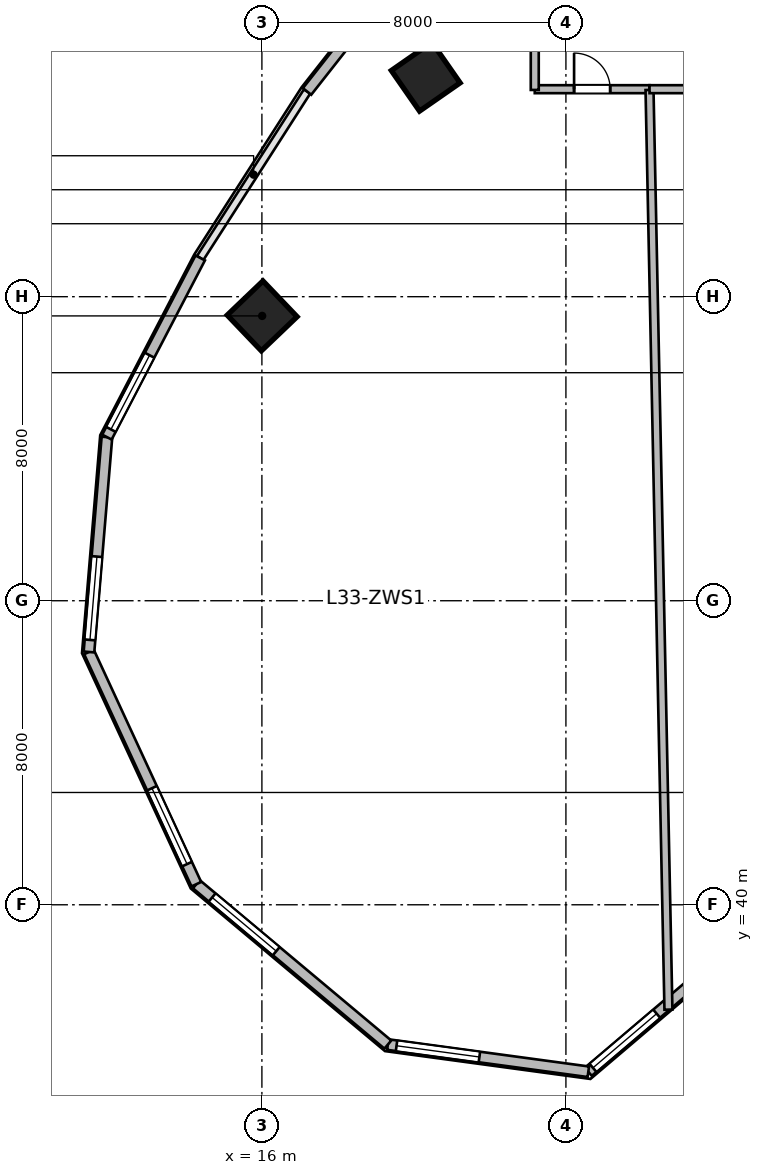
"""IFC4 building model, lengths in metres.
Left out: names, types, materials, properties, quantities, classifications, styles, units other than length and angle.
Written with IfcOpenShell. Run it as: python <this file> out.ifc"""

import sys

from ifc_helpers import new_model, si_unit, direction, frame, frame_2d, origin, origin_2d, place, context, subcontext, project, spatial, rectangle, extrude, source, transform, mapped, element, fill, save


model = new_model("IFC4")
c1 = context("Model", 3, precision=1e-05, world=origin(), true_north=direction((0.0, 1.0)))
c2 = subcontext(c1, "Body", "Model", "MODEL_VIEW")
j1 = project(units=[si_unit("LENGTHUNIT", "METRE"), si_unit("PLANEANGLEUNIT", "RADIAN")], contexts=[c1])
p1 = place(None, origin())
s1 = spatial("IfcSite", under=j1, at=p1, CompositionType="ELEMENT")
p2 = place(p1, origin())
s2 = spatial("IfcBuilding", under=s1, at=p2, CompositionType="ELEMENT")
p3 = place(p2, frame((0.0, 0.0, 138.9)))
s3 = spatial("IfcBuildingStorey", under=s2, at=p3, CompositionType="ELEMENT", Elevation=138.9)
m1 = source(origin(), c2, "Body", "SweptSolid", [
    extrude(rectangle(XDim=1.3, YDim=1.3, at=origin_2d()), origin(), (0.0, 0.0, 1.0), 3.9),
])
for number, where, z_axis, x_axis in (
    (1, (16.007, 55.494, 0.0), (0.0, 0.0, 1.0), (-0.691, 0.723, 0.0)),
    (2, (20.311, 61.789, 0.0), (0.0, 0.0, 1.0), (-0.571, 0.821, 0.0)),
):
    element("IfcColumn", number, at=place(p3, frame(where, z_axis=z_axis, x_axis=x_axis)), inside=s3, PredefinedType="COLUMN", context=c2, shape_type="MappedRepresentation", body=[
        mapped(m1, transform((0.0, 0.0, 0.0), scale=1.0)),
    ])
m2 = source(origin(), c2, "Body", "SweptSolid", [
    extrude(rectangle(XDim=4.659, YDim=0.28, at=frame_2d((2.33, 0.0))), origin(), (0.0, 0.0, 1.0), 3.65),
])
p4 = place(p3, frame((28.139, 38.624, 0.0), z_axis=(0.0, 0.0, 1.0), x_axis=(-0.761913458795, -0.647678841176, 0.0)))
e3 = element("IfcWall", 3, at=p4, inside=s3, PredefinedType="SOLIDWALL", context=c2, shape_type="MappedRepresentation", body=[
    mapped(m2, transform((0.0, 0.0, 0.0), scale=1.0)),
])
p5 = place(p4, frame((2.299, 0.0, 0.95)))
e4 = element("IfcOpeningElement", 4, at=p5, cuts=e3, PredefinedType="OPENING", context=c2, shape_type="SweptSolid", body=[
    extrude(rectangle(XDim=2.2, YDim=2.1, at=frame_2d((1.1, 1.05))), frame((0.0, 0.15, 0.0), z_axis=(0.0, -1.0, 0.0), x_axis=(1.0, 0.0, 0.0)), (0.0, 0.0, 1.0), 0.3),
])
m3 = source(origin(), c2, "Body", "SweptSolid", [
    extrude(rectangle(XDim=5.324, YDim=0.28, at=frame_2d((2.662, 0.0))), origin(), (0.0, 0.0, 1.0), 3.65),
])
p6 = place(p3, frame((24.59, 35.606, 0.0), z_axis=(0.0, 0.0, 1.0), x_axis=(-0.990931467223, 0.134368252451, 0.0)))
e5 = element("IfcWall", 5, at=p6, inside=s3, PredefinedType="SOLIDWALL", context=c2, shape_type="MappedRepresentation", body=[
    mapped(m3, transform((0.0, 0.0, 0.0), scale=1.0)),
])
p7 = place(p6, frame((2.893, 0.0, 0.95)))
e6 = element("IfcOpeningElement", 6, at=p7, cuts=e5, PredefinedType="OPENING", context=c2, shape_type="SweptSolid", body=[
    extrude(rectangle(XDim=2.2, YDim=2.1, at=frame_2d((1.1, 1.05))), frame((0.0, 0.15, 0.0), z_axis=(0.0, -1.0, 0.0), x_axis=(1.0, 0.0, 0.0)), (0.0, 0.0, 1.0), 0.3),
])
m4 = source(origin(), c2, "Body", "SweptSolid", [
    extrude(rectangle(XDim=6.573, YDim=0.28, at=frame_2d((3.287, 0.0))), origin(), (0.0, 0.0, 1.0), 3.65),
])
p8 = place(p3, frame((19.314, 36.322, 0.0), z_axis=(0.0, 0.0, 1.0), x_axis=(-0.766715154163, 0.641987439423, 0.0)))
e7 = element("IfcWall", 7, at=p8, inside=s3, PredefinedType="SOLIDWALL", context=c2, shape_type="MappedRepresentation", body=[
    mapped(m4, transform((0.0, 0.0, 0.0), scale=1.0)),
])
p9 = place(p8, frame((3.83, 0.0, 0.95)))
e8 = element("IfcOpeningElement", 8, at=p9, cuts=e7, PredefinedType="OPENING", context=c2, shape_type="SweptSolid", body=[
    extrude(rectangle(XDim=2.2, YDim=2.1, at=frame_2d((1.1, 1.05))), frame((0.0, 0.15, 0.0), z_axis=(0.0, -1.0, 0.0), x_axis=(1.0, 0.0, 0.0)), (0.0, 0.0, 1.0), 0.3),
])
m5 = source(origin(), c2, "Body", "SweptSolid", [
    extrude(rectangle(XDim=6.732, YDim=0.28, at=frame_2d((3.366, 0.0))), origin(), (0.0, 0.0, 1.0), 3.65),
])
p10 = place(p3, frame((14.275, 40.541, 0.0), z_axis=(0.0, 0.0, 1.0), x_axis=(-0.419644552709, 0.907688520023, 0.0)))
e9 = element("IfcWall", 9, at=p10, inside=s3, PredefinedType="SOLIDWALL", context=c2, shape_type="MappedRepresentation", body=[
    mapped(m5, transform((0.0, 0.0, 0.0), scale=1.0)),
])
p11 = place(p10, frame((0.583, 0.0, 0.95)))
e10 = element("IfcOpeningElement", 10, at=p11, cuts=e9, PredefinedType="OPENING", context=c2, shape_type="SweptSolid", body=[
    extrude(rectangle(XDim=2.2, YDim=2.1, at=frame_2d((1.1, 1.05))), frame((0.0, 0.15, 0.0), z_axis=(0.0, -1.0, 0.0), x_axis=(1.0, 0.0, 0.0)), (0.0, 0.0, 1.0), 0.3),
])
m6 = source(origin(), c2, "Body", "SweptSolid", [
    extrude(rectangle(XDim=5.674, YDim=0.28, at=frame_2d((2.837, 0.0))), origin(), (0.0, 0.0, 1.0), 3.65),
])
p12 = place(p3, frame((11.45, 46.652, 0.0), z_axis=(0.0, 0.0, 1.0), x_axis=(0.083309007867, 0.996523762491, 0.0)))
e11 = element("IfcWall", 11, at=p12, inside=s3, PredefinedType="SOLIDWALL", context=c2, shape_type="MappedRepresentation", body=[
    mapped(m6, transform((0.0, 0.0, 0.0), scale=1.0)),
])
p13 = place(p12, frame((0.318, 0.0, 0.95)))
e12 = element("IfcOpeningElement", 12, at=p13, cuts=e11, PredefinedType="OPENING", context=c2, shape_type="SweptSolid", body=[
    extrude(rectangle(XDim=2.2, YDim=2.1, at=frame_2d((1.1, 1.05))), frame((0.0, 0.15, 0.0), z_axis=(0.0, -1.0, 0.0), x_axis=(1.0, 0.0, 0.0)), (0.0, 0.0, 1.0), 0.3),
])
m7 = source(origin(), c2, "Body", "SweptSolid", [
    extrude(rectangle(XDim=5.315, YDim=0.28, at=frame_2d((2.658, 0.0))), origin(), (0.0, 0.0, 1.0), 3.65),
])
p14 = place(p3, frame((11.922, 52.305, 0.0), z_axis=(0.0, 0.0, 1.0), x_axis=(0.461760527822, 0.887004630735, 0.0)))
e13 = element("IfcWall", 13, at=p14, inside=s3, PredefinedType="SOLIDWALL", context=c2, shape_type="MappedRepresentation", body=[
    mapped(m7, transform((0.0, 0.0, 0.0), scale=1.0)),
])
p15 = place(p14, frame((0.229, 0.0, 0.95)))
e14 = element("IfcOpeningElement", 14, at=p15, cuts=e13, PredefinedType="OPENING", context=c2, shape_type="SweptSolid", body=[
    extrude(rectangle(XDim=2.2, YDim=2.1, at=frame_2d((1.1, 1.05))), frame((0.0, 0.15, 0.0), z_axis=(0.0, -1.0, 0.0), x_axis=(1.0, 0.0, 0.0)), (0.0, 0.0, 1.0), 0.3),
])
m8 = source(origin(), c2, "Body", "SweptSolid", [
    extrude(rectangle(XDim=5.058, YDim=0.28, at=frame_2d((2.529, 0.0))), origin(), (0.0, 0.0, 1.0), 3.65),
])
p16 = place(p3, frame((17.188, 61.4, 0.0), z_axis=(0.0, 0.0, 1.0), x_axis=(0.618145507434, 0.786063694391, 0.0)))
e15 = element("IfcWall", 15, at=p16, inside=s3, PredefinedType="SOLIDWALL", context=c2, shape_type="MappedRepresentation", body=[
    mapped(m8, transform((0.0, 0.0, 0.0), scale=1.0)),
])
m9 = source(origin(), c2, "Body", "SweptSolid", [
    extrude(rectangle(XDim=3.02, YDim=0.21, at=frame_2d((1.51, 0.0))), origin(), (0.0, 0.0, 1.0), 3.65),
])
p17 = place(p3, frame((23.18, 61.46, 0.0), z_axis=(0.0, 0.0, 1.0), x_axis=(1.0, 0.0, 0.0)))
e16 = element("IfcWall", 16, at=p17, inside=s3, PredefinedType="PARTITIONING", context=c2, shape_type="MappedRepresentation", body=[
    mapped(m9, transform((0.0, 0.0, 0.0), scale=1.0)),
])
p18 = place(p17, frame((1.035, 0.0, 0.0)))
e17 = element("IfcOpeningElement", 17, at=p18, cuts=e16, PredefinedType="OPENING", context=c2, shape_type="SweptSolid", body=[
    extrude(rectangle(XDim=0.95, YDim=2.1, at=frame_2d((0.475, 1.05))), frame((0.0, 0.115, 0.0), z_axis=(0.0, -1.0, 0.0), x_axis=(1.0, 0.0, 0.0)), (0.0, 0.0, 1.0), 0.23),
])
m10 = source(origin(), c2, "Body", "SweptSolid", [
    extrude(rectangle(XDim=24.204, YDim=0.21, at=frame_2d((12.102, 0.0))), origin(), (0.0, 0.0, 1.0), 2.942),
])
p19 = place(p3, frame((26.698, 37.241, 0.0), z_axis=(0.0, 0.0, 1.0), x_axis=(-0.020566881318, 0.999788479326, 0.0)))
e18 = element("IfcWall", 18, at=p19, inside=s3, PredefinedType="PARTITIONING", context=c2, shape_type="MappedRepresentation", body=[
    mapped(m10, transform((0.0, 0.0, 0.0), scale=1.0)),
])
m11 = source(origin(), c2, "Body", "SweptSolid", [
    extrude(rectangle(XDim=4.0, YDim=0.21, at=frame_2d((2.0, 0.0))), origin(), (0.0, 0.0, 1.0), 3.65),
])
p20 = place(p3, frame((26.2, 61.46, 0.0), z_axis=(0.0, 0.0, 1.0), x_axis=(1.0, 0.0, 0.0)))
e19 = element("IfcWall", 19, at=p20, inside=s3, PredefinedType="PARTITIONING", context=c2, shape_type="MappedRepresentation", body=[
    mapped(m11, transform((0.0, 0.0, 0.0), scale=1.0)),
])
p21 = place(p20, frame((1.525, 0.0, 0.0)))
e20 = element("IfcOpeningElement", 20, at=p21, cuts=e19, PredefinedType="OPENING", context=c2, shape_type="SweptSolid", body=[
    extrude(rectangle(XDim=0.95, YDim=2.1, at=frame_2d((0.475, 1.05))), frame((0.0, 0.115, 0.0), z_axis=(0.0, -1.0, 0.0), x_axis=(1.0, 0.0, 0.0)), (0.0, 0.0, 1.0), 0.23),
])
m12 = source(origin(), c2, "Body", "SweptSolid", [
    extrude(rectangle(XDim=2.62, YDim=0.21, at=frame_2d((1.31, 0.0))), origin(), (0.0, 0.0, 1.0), 3.65),
])
p22 = place(p3, frame((23.18, 61.44, 0.0), z_axis=(0.0, 0.0, 1.0), x_axis=(0.0, 1.0, 0.0)))
e21 = element("IfcWall", 21, at=p22, inside=s3, PredefinedType="PARTITIONING", context=c2, shape_type="MappedRepresentation", body=[
    mapped(m12, transform((0.0, 0.0, 0.0), scale=1.0)),
])
m13 = source(origin(), c2, "Body", "SweptSolid", [
    extrude(rectangle(XDim=2.2, YDim=2.1, at=frame_2d((1.1, 1.05))), frame((0.0, 0.03, 0.0), z_axis=(0.0, -1.0, 0.0), x_axis=(1.0, 0.0, 0.0)), (0.0, 0.0, 1.0), 0.06),
])
p23 = place(p5, origin())
e22 = element("IfcWindow", 22, at=p23, inside=s3, PartitioningType="TRIPLE_PANEL_VERTICAL", PredefinedType="WINDOW", context=c2, shape_type="MappedRepresentation", body=[
    mapped(m13, transform((0.0, 0.0, 0.0), scale=1.0)),
])
fill(e4, e22)
p24 = place(p7, origin())
e23 = element("IfcWindow", 23, at=p24, inside=s3, PartitioningType="TRIPLE_PANEL_VERTICAL", PredefinedType="WINDOW", context=c2, shape_type="MappedRepresentation", body=[
    mapped(m13, transform((0.0, 0.0, 0.0), scale=1.0)),
])
fill(e6, e23)
p25 = place(p9, origin())
e24 = element("IfcWindow", 24, at=p25, inside=s3, PartitioningType="TRIPLE_PANEL_VERTICAL", PredefinedType="WINDOW", context=c2, shape_type="MappedRepresentation", body=[
    mapped(m13, transform((0.0, 0.0, 0.0), scale=1.0)),
])
fill(e8, e24)
p26 = place(p11, origin())
e25 = element("IfcWindow", 25, at=p26, inside=s3, PartitioningType="TRIPLE_PANEL_VERTICAL", PredefinedType="WINDOW", context=c2, shape_type="MappedRepresentation", body=[
    mapped(m13, transform((0.0, 0.0, 0.0), scale=1.0)),
])
fill(e10, e25)
p27 = place(p13, origin())
e26 = element("IfcWindow", 26, at=p27, inside=s3, PartitioningType="TRIPLE_PANEL_VERTICAL", PredefinedType="WINDOW", context=c2, shape_type="MappedRepresentation", body=[
    mapped(m13, transform((0.0, 0.0, 0.0), scale=1.0)),
])
fill(e12, e26)
p28 = place(p15, origin())
e27 = element("IfcWindow", 27, at=p28, inside=s3, PartitioningType="TRIPLE_PANEL_VERTICAL", PredefinedType="WINDOW", context=c2, shape_type="MappedRepresentation", body=[
    mapped(m13, transform((0.0, 0.0, 0.0), scale=1.0)),
])
fill(e14, e27)
m14 = source(origin(), c2, "Body", "SweptSolid", [
    extrude(rectangle(XDim=0.95, YDim=2.1, at=frame_2d((0.475, 1.05))), frame((0.0, 0.025, 0.0), z_axis=(0.0, -1.0, 0.0), x_axis=(1.0, 0.0, 0.0)), (0.0, 0.0, 1.0), 0.05),
])
p29 = place(p18, origin())
e28 = element("IfcDoor", 28, at=p29, inside=s3, OperationType="SINGLE_SWING_LEFT", PredefinedType="DOOR", context=c2, shape_type="MappedRepresentation", body=[
    mapped(m14, transform((0.0, 0.0, 0.0), scale=1.0)),
])
fill(e17, e28)
save(model, sys.argv[1])
